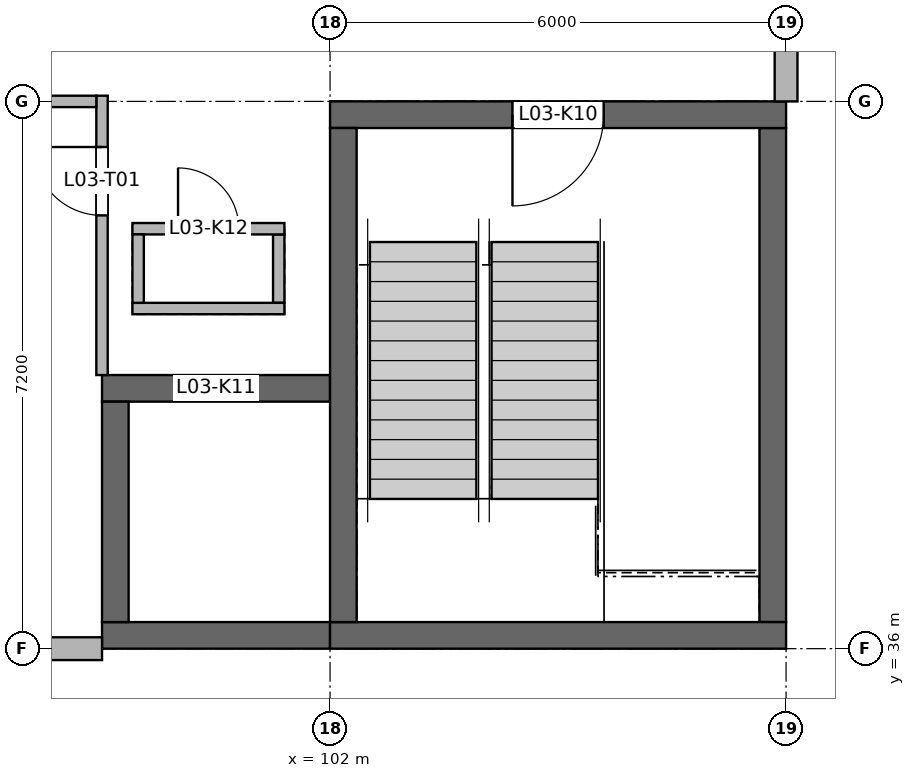
"""IFC4 building model, lengths in metres.
Left out: names, types, materials, properties, quantities, classifications, styles, units other than length and angle.
Written with IfcOpenShell. Run it as: python <this file> out.ifc"""

import sys

from ifc_helpers import new_model, si_unit, direction, frame, frame_2d, origin, place, context, subcontext, project, spatial, rectangle, extrude, element, fill, save


model = new_model("IFC4")
c1 = context("Model", 3, precision=1e-05, world=origin(), true_north=direction((0.0, 1.0)))
c2 = subcontext(c1, "Body", "Model", "MODEL_VIEW")
j1 = project(units=[si_unit("LENGTHUNIT", "METRE"), si_unit("PLANEANGLEUNIT", "RADIAN")], contexts=[c1])
p1 = place(None, origin())
s1 = spatial("IfcSite", under=j1, at=p1, CompositionType="ELEMENT")
p2 = place(p1, origin())
s2 = spatial("IfcBuilding", under=s1, at=p2, CompositionType="ELEMENT")
p3 = place(p2, frame((0.0, 0.0, 12.6)))
s3 = spatial("IfcBuildingStorey", under=s2, at=p3, CompositionType="ELEMENT", Elevation=12.6)
p4 = place(p3, frame((102.0, 36.175, 0.0), z_axis=(0.0, 0.0, 1.0), x_axis=(1.0, 0.0, 0.0)))
e1 = element("IfcWall", 1, at=p4, inside=s3, PredefinedType="SHEAR", context=c2, shape_type="SweptSolid", body=[
    extrude(rectangle(XDim=6.0, YDim=0.35, at=frame_2d((3.0, 0.0))), origin(), (0.0, 0.0, 1.0), 4.0),
])
p5 = place(p3, frame((102.0, 43.025, 0.0), z_axis=(0.0, 0.0, 1.0), x_axis=(1.0, 0.0, 0.0)))
e2 = element("IfcWall", 2, at=p5, inside=s3, PredefinedType="SHEAR", context=c2, shape_type="SweptSolid", body=[
    extrude(rectangle(XDim=6.0, YDim=0.35, at=frame_2d((3.0, 0.0))), origin(), (0.0, 0.0, 1.0), 4.0),
])
p6 = place(p5, frame((2.4, 0.0, 0.0)))
e3 = element("IfcOpeningElement", 3, at=p6, cuts=e2, PredefinedType="OPENING", context=c2, shape_type="SweptSolid", body=[
    extrude(rectangle(XDim=1.2, YDim=2.1, at=frame_2d((0.6, 1.05))), frame((0.0, 0.185, 0.0), z_axis=(0.0, -1.0, 0.0), x_axis=(1.0, 0.0, 0.0)), (0.0, 0.0, 1.0), 0.37),
])
for number, where, z_axis, x_axis in (
    (4, (102.175, 36.35, 0.0), (0.0, 0.0, 1.0), (0.0, 1.0, 0.0)),
    (5, (107.825, 36.35, 0.0), (0.0, 0.0, 1.0), (0.0, 1.0, 0.0)),
):
    element("IfcWall", number, at=place(p3, frame(where, z_axis=z_axis, x_axis=x_axis)), inside=s3, PredefinedType="SHEAR", context=c2, shape_type="SweptSolid", body=[
        extrude(rectangle(XDim=6.5, YDim=0.35, at=frame_2d((3.25, 0.0))), origin(), (0.0, 0.0, 1.0), 4.0),
    ])
p7 = place(p3, frame((99.0, 36.175, 0.0), z_axis=(0.0, 0.0, 1.0), x_axis=(1.0, 0.0, 0.0)))
e6 = element("IfcWall", 6, at=p7, inside=s3, PredefinedType="SHEAR", context=c2, shape_type="SweptSolid", body=[
    extrude(rectangle(XDim=3.0, YDim=0.35, at=frame_2d((1.5, 0.0))), origin(), (0.0, 0.0, 1.0), 4.2),
])
p8 = place(p3, frame((99.0, 39.425, 0.0), z_axis=(0.0, 0.0, 1.0), x_axis=(1.0, 0.0, 0.0)))
e7 = element("IfcWall", 7, at=p8, inside=s3, PredefinedType="SHEAR", context=c2, shape_type="SweptSolid", body=[
    extrude(rectangle(XDim=3.0, YDim=0.35, at=frame_2d((1.5, 0.0))), origin(), (0.0, 0.0, 1.0), 4.2),
])
p9 = place(p8, frame((0.95, 0.0, 0.0)))
e8 = element("IfcOpeningElement", 8, at=p9, cuts=e7, PredefinedType="OPENING", context=c2, shape_type="SweptSolid", body=[
    extrude(rectangle(XDim=1.1, YDim=2.1, at=frame_2d((0.55, 1.05))), frame((0.0, 0.185, 0.0), z_axis=(0.0, -1.0, 0.0), x_axis=(1.0, 0.0, 0.0)), (0.0, 0.0, 1.0), 0.37),
])
p10 = place(p3, frame((99.175, 36.35, 0.0), z_axis=(0.0, 0.0, 1.0), x_axis=(0.0, 1.0, 0.0)))
e9 = element("IfcWall", 9, at=p10, inside=s3, PredefinedType="SHEAR", context=c2, shape_type="SweptSolid", body=[
    extrude(rectangle(XDim=2.9, YDim=0.35, at=frame_2d((1.45, 0.0))), origin(), (0.0, 0.0, 1.0), 4.2),
])
p11 = place(p3, frame((99.4, 40.475, 0.0), z_axis=(0.0, 0.0, 1.0), x_axis=(1.0, 0.0, 0.0)))
e10 = element("IfcWall", 10, at=p11, inside=s3, PredefinedType="SOLIDWALL", context=c2, shape_type="SweptSolid", body=[
    extrude(rectangle(XDim=2.0, YDim=0.15, at=frame_2d((1.0, 0.0))), origin(), (0.0, 0.0, 1.0), 4.2),
])
p12 = place(p3, frame((99.4, 41.525, 0.0), z_axis=(0.0, 0.0, 1.0), x_axis=(1.0, 0.0, 0.0)))
e11 = element("IfcWall", 11, at=p12, inside=s3, PredefinedType="SOLIDWALL", context=c2, shape_type="SweptSolid", body=[
    extrude(rectangle(XDim=2.0, YDim=0.15, at=frame_2d((1.0, 0.0))), origin(), (0.0, 0.0, 1.0), 4.2),
])
p13 = place(p12, frame((0.6, 0.0, 0.0)))
e12 = element("IfcOpeningElement", 12, at=p13, cuts=e11, PredefinedType="OPENING", context=c2, shape_type="SweptSolid", body=[
    extrude(rectangle(XDim=0.8, YDim=2.1, at=frame_2d((0.4, 1.05))), frame((0.0, 0.085, 0.0), z_axis=(0.0, -1.0, 0.0), x_axis=(1.0, 0.0, 0.0)), (0.0, 0.0, 1.0), 0.17),
])
for number, where, z_axis, x_axis in (
    (13, (99.475, 40.55, 0.0), (0.0, 0.0, 1.0), (0.0, 1.0, 0.0)),
    (14, (101.325, 40.55, 0.0), (0.0, 0.0, 1.0), (0.0, 1.0, 0.0)),
):
    element("IfcWall", number, at=place(p3, frame(where, z_axis=z_axis, x_axis=x_axis)), inside=s3, PredefinedType="SOLIDWALL", context=c2, shape_type="SweptSolid", body=[
        extrude(rectangle(XDim=0.9, YDim=0.15, at=frame_2d((0.45, 0.0))), origin(), (0.0, 0.0, 1.0), 4.2),
    ])
p14 = place(p3, frame((108.0, 43.2, 0.0), z_axis=(0.0, 0.0, 1.0), x_axis=(0.0, 1.0, 0.0)))
e15 = element("IfcWall", 15, at=p14, inside=s3, PredefinedType="SOLIDWALL", context=c2, shape_type="SweptSolid", body=[
    extrude(rectangle(XDim=6.85, YDim=0.3, at=frame_2d((3.425, 0.0))), origin(), (0.0, 0.0, 1.0), 3.1),
])
p15 = place(p14, frame((2.597, 0.0, 0.9)))
e16 = element("IfcOpeningElement", 16, at=p15, cuts=e15, PredefinedType="OPENING", context=c2, shape_type="SweptSolid", body=[
    extrude(rectangle(XDim=0.9, YDim=1.2, at=frame_2d((0.45, 0.6))), frame((0.0, 0.16, 0.0), z_axis=(0.0, -1.0, 0.0), x_axis=(1.0, 0.0, 0.0)), (0.0, 0.0, 1.0), 0.32),
])
p16 = place(p14, frame((4.015, 0.0, 0.9)))
e17 = element("IfcOpeningElement", 17, at=p16, cuts=e15, PredefinedType="OPENING", context=c2, shape_type="SweptSolid", body=[
    extrude(rectangle(XDim=0.9, YDim=1.2, at=frame_2d((0.45, 0.6))), frame((0.0, 0.16, 0.0), z_axis=(0.0, -1.0, 0.0), x_axis=(1.0, 0.0, 0.0)), (0.0, 0.0, 1.0), 0.32),
])
p17 = place(p14, frame((5.433, 0.0, 0.9)))
e18 = element("IfcOpeningElement", 18, at=p17, cuts=e15, PredefinedType="OPENING", context=c2, shape_type="SweptSolid", body=[
    extrude(rectangle(XDim=0.9, YDim=1.2, at=frame_2d((0.45, 0.6))), frame((0.0, 0.16, 0.0), z_axis=(0.0, -1.0, 0.0), x_axis=(1.0, 0.0, 0.0)), (0.0, 0.0, 1.0), 0.32),
])
p18 = place(p3, frame((96.35, 36.0, 0.0), z_axis=(0.0, 0.0, 1.0), x_axis=(1.0, 0.0, 0.0)))
e19 = element("IfcWall", 19, at=p18, inside=s3, PredefinedType="SOLIDWALL", context=c2, shape_type="SweptSolid", body=[
    extrude(rectangle(XDim=2.65, YDim=0.3, at=frame_2d((1.325, 0.0))), origin(), (0.0, 0.0, 1.0), 3.3),
])
p19 = place(p18, frame((0.715, 0.0, 0.9)))
e20 = element("IfcOpeningElement", 20, at=p19, cuts=e19, PredefinedType="OPENING", context=c2, shape_type="SweptSolid", body=[
    extrude(rectangle(XDim=0.9, YDim=1.2, at=frame_2d((0.45, 0.6))), frame((0.0, 0.16, 0.0), z_axis=(0.0, -1.0, 0.0), x_axis=(1.0, 0.0, 0.0)), (0.0, 0.0, 1.0), 0.32),
])
p20 = place(p3, frame((99.0, 39.6, 0.0), z_axis=(0.0, 0.0, 1.0), x_axis=(0.0, 1.0, 0.0)))
e21 = element("IfcWall", 21, at=p20, inside=s3, PredefinedType="PARTITIONING", context=c2, shape_type="SweptSolid", body=[
    extrude(rectangle(XDim=3.675, YDim=0.15, at=frame_2d((1.837, 0.0))), origin(), (0.0, 0.0, 1.0), 4.0),
])
p21 = place(p20, frame((2.1, 0.0, 0.0)))
e22 = element("IfcOpeningElement", 22, at=p21, cuts=e21, PredefinedType="OPENING", context=c2, shape_type="SweptSolid", body=[
    extrude(rectangle(XDim=0.9, YDim=2.1, at=frame_2d((0.45, 1.05))), frame((0.0, 0.085, 0.0), z_axis=(0.0, -1.0, 0.0), x_axis=(1.0, 0.0, 0.0)), (0.0, 0.0, 1.0), 0.17),
])
p22 = place(p3, frame((90.15, 43.2, 0.0), z_axis=(0.0, 0.0, 1.0), x_axis=(1.0, 0.0, 0.0)))
e23 = element("IfcWall", 23, at=p22, inside=s3, PredefinedType="PARTITIONING", context=c2, shape_type="SweptSolid", body=[
    extrude(rectangle(XDim=8.775, YDim=0.15, at=frame_2d((4.388, 0.0))), origin(), (0.0, 0.0, 1.0), 3.3),
])
p23 = place(p22, frame((1.05, 0.0, 0.0)))
e24 = element("IfcOpeningElement", 24, at=p23, cuts=e23, PredefinedType="OPENING", context=c2, shape_type="SweptSolid", body=[
    extrude(rectangle(XDim=1.2, YDim=2.1, at=frame_2d((0.6, 1.05))), frame((0.0, 0.085, 0.0), z_axis=(0.0, -1.0, 0.0), x_axis=(1.0, 0.0, 0.0)), (0.0, 0.0, 1.0), 0.17),
])
p24 = place(p22, frame((4.2, 0.0, 0.0)))
e25 = element("IfcOpeningElement", 25, at=p24, cuts=e23, PredefinedType="OPENING", context=c2, shape_type="SweptSolid", body=[
    extrude(rectangle(XDim=0.9, YDim=2.1, at=frame_2d((0.45, 1.05))), frame((0.0, 0.085, 0.0), z_axis=(0.0, -1.0, 0.0), x_axis=(1.0, 0.0, 0.0)), (0.0, 0.0, 1.0), 0.17),
])
p25 = place(p6, frame((1.2, 0.0, 0.0), z_axis=(0.0, 0.0, 1.0), x_axis=(-1.0, 0.0, 0.0)))
e26 = element("IfcDoor", 26, at=p25, inside=s3, OperationType="SINGLE_SWING_RIGHT", PredefinedType="DOOR", context=c2, shape_type="SweptSolid", body=[
    extrude(rectangle(XDim=1.2, YDim=2.1, at=frame_2d((0.6, 1.05))), frame((0.0, 0.025, 0.0), z_axis=(0.0, -1.0, 0.0), x_axis=(1.0, 0.0, 0.0)), (0.0, 0.0, 1.0), 0.05),
])
fill(e3, e26)
p26 = place(p9, origin())
e27 = element("IfcDoor", 27, at=p26, inside=s3, OperationType="DOUBLE_DOOR_SLIDING", PredefinedType="DOOR", context=c2, shape_type="SweptSolid", body=[
    extrude(rectangle(XDim=1.1, YDim=2.1, at=frame_2d((0.55, 1.05))), frame((0.0, 0.025, 0.0), z_axis=(0.0, -1.0, 0.0), x_axis=(1.0, 0.0, 0.0)), (0.0, 0.0, 1.0), 0.05),
])
fill(e8, e27)
p27 = place(p13, origin())
e28 = element("IfcDoor", 28, at=p27, inside=s3, OperationType="SINGLE_SWING_LEFT", PredefinedType="DOOR", context=c2, shape_type="SweptSolid", body=[
    extrude(rectangle(XDim=0.8, YDim=2.1, at=frame_2d((0.4, 1.05))), frame((0.0, 0.025, 0.0), z_axis=(0.0, -1.0, 0.0), x_axis=(1.0, 0.0, 0.0)), (0.0, 0.0, 1.0), 0.05),
])
fill(e12, e28)
p28 = place(p21, origin())
e29 = element("IfcDoor", 29, at=p28, inside=s3, OperationType="SINGLE_SWING_RIGHT", PredefinedType="DOOR", context=c2, shape_type="SweptSolid", body=[
    extrude(rectangle(XDim=0.9, YDim=2.1, at=frame_2d((0.45, 1.05))), frame((0.0, 0.025, 0.0), z_axis=(0.0, -1.0, 0.0), x_axis=(1.0, 0.0, 0.0)), (0.0, 0.0, 1.0), 0.05),
])
fill(e22, e29)
save(model, sys.argv[1])
